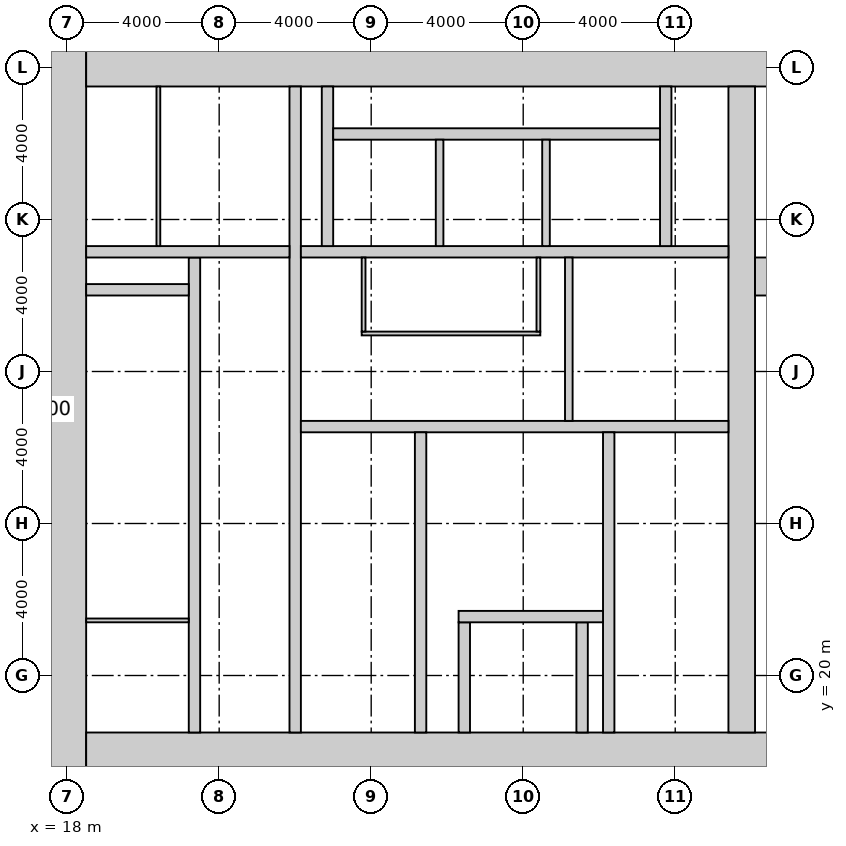
"""IFC4 building model, lengths in metres.
Left out: names, types, materials, properties, quantities, classifications, styles, units other than length and angle.
Written with IfcOpenShell. Run it as: python <this file> out.ifc"""

import sys

from ifc_helpers import new_model, si_unit, direction, frame, frame_2d, origin, place, context, subcontext, project, spatial, rectangle, extrude, element, fill, save


model = new_model("IFC4")
c1 = context("Model", 3, precision=1e-05, world=origin(), true_north=direction((0.0, 1.0)))
c2 = subcontext(c1, "Body", "Model", "MODEL_VIEW")
j1 = project(units=[si_unit("LENGTHUNIT", "METRE"), si_unit("PLANEANGLEUNIT", "RADIAN")], contexts=[c1])
p1 = place(None, origin())
s1 = spatial("IfcSite", under=j1, at=p1, CompositionType="ELEMENT")
p2 = place(p1, origin())
s2 = spatial("IfcBuilding", under=s1, at=p2, CompositionType="ELEMENT")
p3 = place(p2, frame((0.0, 0.0, 19.0)))
s3 = spatial("IfcBuildingStorey", under=s2, at=p3, CompositionType="ELEMENT", Elevation=19.0)
p4 = place(p3, frame((18.0, 17.1, -0.15), z_axis=(0.0, 0.0, 1.0), x_axis=(0.0, 1.0, 0.0)))
e1 = element("IfcWall", 1, at=p4, inside=s3, PredefinedType="SHEAR", context=c2, shape_type="SweptSolid", body=[
    extrude(rectangle(XDim=19.8, YDim=1.0, at=frame_2d((9.9, 0.0))), origin(), (0.0, 0.0, 1.0), 4.0),
])
p5 = place(p3, frame((18.5, 17.8, -0.15), z_axis=(0.0, 0.0, 1.0), x_axis=(1.0, 0.0, 0.0)))
e2 = element("IfcWall", 2, at=p5, inside=s3, PredefinedType="SHEAR", context=c2, shape_type="SweptSolid", body=[
    extrude(rectangle(XDim=23.0, YDim=1.4, at=frame_2d((11.5, 0.0))), origin(), (0.0, 0.0, 1.0), 4.0),
])
p6 = place(p5, frame((3.45, 0.0, 0.15)))
e3 = element("IfcOpeningElement", 3, at=p6, cuts=e2, PredefinedType="OPENING", context=c2, shape_type="SweptSolid", body=[
    extrude(rectangle(XDim=1.5, YDim=2.4, at=frame_2d((0.75, 1.2))), frame((0.0, 0.71, 0.0), z_axis=(0.0, -1.0, 0.0), x_axis=(1.0, 0.0, 0.0)), (0.0, 0.0, 1.0), 1.42),
])
p7 = place(p5, frame((17.9, 0.0, 0.15)))
e4 = element("IfcOpeningElement", 4, at=p7, cuts=e2, PredefinedType="OPENING", context=c2, shape_type="SweptSolid", body=[
    extrude(rectangle(XDim=1.5, YDim=2.4, at=frame_2d((0.75, 1.2))), frame((0.0, 0.71, 0.0), z_axis=(0.0, -1.0, 0.0), x_axis=(1.0, 0.0, 0.0)), (0.0, 0.0, 1.0), 1.42),
])
p8 = place(p5, frame((0.9, 0.0, 0.15)))
e5 = element("IfcOpeningElement", 5, at=p8, cuts=e2, PredefinedType="OPENING", context=c2, shape_type="SweptSolid", body=[
    extrude(rectangle(XDim=1.0, YDim=2.2, at=frame_2d((0.5, 1.1))), frame((0.0, 0.71, 0.0), z_axis=(0.0, -1.0, 0.0), x_axis=(1.0, 0.0, 0.0)), (0.0, 0.0, 1.0), 1.42),
])
p9 = place(p3, frame((18.5, 36.2, -0.15), z_axis=(0.0, 0.0, 1.0), x_axis=(1.0, 0.0, 0.0)))
e6 = element("IfcWall", 6, at=p9, inside=s3, PredefinedType="SHEAR", context=c2, shape_type="SweptSolid", body=[
    extrude(rectangle(XDim=23.0, YDim=1.4, at=frame_2d((11.5, 0.0))), origin(), (0.0, 0.0, 1.0), 4.0),
])
p10 = place(p3, frame((35.75, 18.5, -0.15), z_axis=(0.0, 0.0, 1.0), x_axis=(0.0, 1.0, 0.0)))
e7 = element("IfcWall", 7, at=p10, inside=s3, PredefinedType="SHEAR", context=c2, shape_type="SweptSolid", body=[
    extrude(rectangle(XDim=17.0, YDim=0.7, at=frame_2d((8.5, 0.0))), origin(), (0.0, 0.0, 1.0), 4.0),
])
p11 = place(p10, frame((9.85, 0.0, 0.15)))
e8 = element("IfcOpeningElement", 8, at=p11, cuts=e7, PredefinedType="OPENING", context=c2, shape_type="SweptSolid", body=[
    extrude(rectangle(XDim=1.0, YDim=2.2, at=frame_2d((0.5, 1.1))), frame((0.0, 0.36, 0.0), z_axis=(0.0, -1.0, 0.0), x_axis=(1.0, 0.0, 0.0)), (0.0, 0.0, 1.0), 0.72),
])
p12 = place(p3, frame((24.0, 18.5, -0.15), z_axis=(0.0, 0.0, 1.0), x_axis=(0.0, 1.0, 0.0)))
e9 = element("IfcWall", 9, at=p12, inside=s3, PredefinedType="SHEAR", context=c2, shape_type="SweptSolid", body=[
    extrude(rectangle(XDim=17.0, YDim=0.3, at=frame_2d((8.5, 0.0))), origin(), (0.0, 0.0, 1.0), 4.0),
])
p13 = place(p12, frame((9.6, 0.0, 0.15)))
e10 = element("IfcOpeningElement", 10, at=p13, cuts=e9, PredefinedType="OPENING", context=c2, shape_type="SweptSolid", body=[
    extrude(rectangle(XDim=1.5, YDim=2.4, at=frame_2d((0.75, 1.2))), frame((0.0, 0.16, 0.0), z_axis=(0.0, -1.0, 0.0), x_axis=(1.0, 0.0, 0.0)), (0.0, 0.0, 1.0), 0.32),
])
p14 = place(p3, frame((24.15, 26.55, -0.15), z_axis=(0.0, 0.0, 1.0), x_axis=(1.0, 0.0, 0.0)))
e11 = element("IfcWall", 11, at=p14, inside=s3, PredefinedType="SHEAR", context=c2, shape_type="SweptSolid", body=[
    extrude(rectangle(XDim=11.25, YDim=0.3, at=frame_2d((5.625, 0.0))), origin(), (0.0, 0.0, 1.0), 4.0),
])
p15 = place(p14, frame((9.25, 0.0, 0.15)))
e12 = element("IfcOpeningElement", 12, at=p15, cuts=e11, PredefinedType="OPENING", context=c2, shape_type="SweptSolid", body=[
    extrude(rectangle(XDim=1.0, YDim=2.2, at=frame_2d((0.5, 1.1))), frame((0.0, 0.16, 0.0), z_axis=(0.0, -1.0, 0.0), x_axis=(1.0, 0.0, 0.0)), (0.0, 0.0, 1.0), 0.32),
])
p16 = place(p14, frame((4.9, 0.0, 0.15)))
e13 = element("IfcOpeningElement", 13, at=p16, cuts=e11, PredefinedType="OPENING", context=c2, shape_type="SweptSolid", body=[
    extrude(rectangle(XDim=1.5, YDim=2.4, at=frame_2d((0.75, 1.2))), frame((0.0, 0.16, 0.0), z_axis=(0.0, -1.0, 0.0), x_axis=(1.0, 0.0, 0.0)), (0.0, 0.0, 1.0), 0.32),
])
p17 = place(p3, frame((27.3, 18.5, -0.15), z_axis=(0.0, 0.0, 1.0), x_axis=(0.0, 1.0, 0.0)))
e14 = element("IfcWall", 14, at=p17, inside=s3, PredefinedType="SHEAR", context=c2, shape_type="SweptSolid", body=[
    extrude(rectangle(XDim=7.9, YDim=0.3, at=frame_2d((3.95, 0.0))), origin(), (0.0, 0.0, 1.0), 4.0),
])
p18 = place(p17, frame((6.4, 0.0, 0.15)))
e15 = element("IfcOpeningElement", 15, at=p18, cuts=e14, PredefinedType="OPENING", context=c2, shape_type="SweptSolid", body=[
    extrude(rectangle(XDim=1.0, YDim=2.2, at=frame_2d((0.5, 1.1))), frame((0.0, 0.16, 0.0), z_axis=(0.0, -1.0, 0.0), x_axis=(1.0, 0.0, 0.0)), (0.0, 0.0, 1.0), 0.32),
])
p19 = place(p3, frame((32.25, 18.5, -0.15), z_axis=(0.0, 0.0, 1.0), x_axis=(0.0, 1.0, 0.0)))
e16 = element("IfcWall", 16, at=p19, inside=s3, PredefinedType="SHEAR", context=c2, shape_type="SweptSolid", body=[
    extrude(rectangle(XDim=7.9, YDim=0.3, at=frame_2d((3.95, 0.0))), origin(), (0.0, 0.0, 1.0), 4.0),
])
for number, where, z_axis, x_axis in (
    (17, (28.45, 18.5, -0.15), (0.0, 0.0, 1.0), (0.0, 1.0, 0.0)),
    (18, (31.55, 18.5, -0.15), (0.0, 0.0, 1.0), (0.0, 1.0, 0.0)),
):
    element("IfcWall", number, at=place(p3, frame(where, z_axis=z_axis, x_axis=x_axis)), inside=s3, PredefinedType="SHEAR", context=c2, shape_type="SweptSolid", body=[
        extrude(rectangle(XDim=2.9, YDim=0.3, at=frame_2d((1.45, 0.0))), origin(), (0.0, 0.0, 1.0), 4.0),
    ])
p20 = place(p3, frame((28.3, 21.55, -0.15), z_axis=(0.0, 0.0, 1.0), x_axis=(1.0, 0.0, 0.0)))
e19 = element("IfcWall", 19, at=p20, inside=s3, PredefinedType="SHEAR", context=c2, shape_type="SweptSolid", body=[
    extrude(rectangle(XDim=3.8, YDim=0.3, at=frame_2d((1.9, 0.0))), origin(), (0.0, 0.0, 1.0), 4.0),
])
p21 = place(p20, frame((1.05, 0.0, 0.15)))
e20 = element("IfcOpeningElement", 20, at=p21, cuts=e19, PredefinedType="OPENING", context=c2, shape_type="SweptSolid", body=[
    extrude(rectangle(XDim=1.3, YDim=2.4, at=frame_2d((0.65, 1.2))), frame((0.0, 0.16, 0.0), z_axis=(0.0, -1.0, 0.0), x_axis=(1.0, 0.0, 0.0)), (0.0, 0.0, 1.0), 0.32),
])
p22 = place(p3, frame((24.15, 31.15, -0.15), z_axis=(0.0, 0.0, 1.0), x_axis=(1.0, 0.0, 0.0)))
e21 = element("IfcWall", 21, at=p22, inside=s3, PredefinedType="SHEAR", context=c2, shape_type="SweptSolid", body=[
    extrude(rectangle(XDim=11.25, YDim=0.3, at=frame_2d((5.625, 0.0))), origin(), (0.0, 0.0, 1.0), 4.0),
])
p23 = place(p22, frame((7.25, 0.0, 0.15)))
e22 = element("IfcOpeningElement", 22, at=p23, cuts=e21, PredefinedType="OPENING", context=c2, shape_type="SweptSolid", body=[
    extrude(rectangle(XDim=1.4, YDim=2.4, at=frame_2d((0.7, 1.2))), frame((0.0, 0.16, 0.0), z_axis=(0.0, -1.0, 0.0), x_axis=(1.0, 0.0, 0.0)), (0.0, 0.0, 1.0), 0.32),
])
p24 = place(p3, frame((21.35, 18.5, -0.15), z_axis=(0.0, 0.0, 1.0), x_axis=(0.0, 1.0, 0.0)))
e23 = element("IfcWall", 23, at=p24, inside=s3, PredefinedType="SHEAR", context=c2, shape_type="SweptSolid", body=[
    extrude(rectangle(XDim=12.5, YDim=0.3, at=frame_2d((6.25, 0.0))), origin(), (0.0, 0.0, 1.0), 4.0),
])
p25 = place(p24, frame((6.725, 0.0, 0.15)))
e24 = element("IfcOpeningElement", 24, at=p25, cuts=e23, PredefinedType="OPENING", context=c2, shape_type="SweptSolid", body=[
    extrude(rectangle(XDim=1.0, YDim=2.2, at=frame_2d((0.5, 1.1))), frame((0.0, 0.16, 0.0), z_axis=(0.0, -1.0, 0.0), x_axis=(1.0, 0.0, 0.0)), (0.0, 0.0, 1.0), 0.32),
])
p26 = place(p3, frame((18.5, 31.15, -0.15), z_axis=(0.0, 0.0, 1.0), x_axis=(1.0, 0.0, 0.0)))
e25 = element("IfcWall", 25, at=p26, inside=s3, PredefinedType="SHEAR", context=c2, shape_type="SweptSolid", body=[
    extrude(rectangle(XDim=5.35, YDim=0.3, at=frame_2d((2.675, 0.0))), origin(), (0.0, 0.0, 1.0), 4.0),
])
p27 = place(p26, frame((3.4, 0.0, 0.15)))
e26 = element("IfcOpeningElement", 26, at=p27, cuts=e25, PredefinedType="OPENING", context=c2, shape_type="SweptSolid", body=[
    extrude(rectangle(XDim=1.0, YDim=2.2, at=frame_2d((0.5, 1.1))), frame((0.0, 0.16, 0.0), z_axis=(0.0, -1.0, 0.0), x_axis=(1.0, 0.0, 0.0)), (0.0, 0.0, 1.0), 0.32),
])
p28 = place(p3, frame((18.5, 30.15, -0.15), z_axis=(0.0, 0.0, 1.0), x_axis=(1.0, 0.0, 0.0)))
e27 = element("IfcWall", 27, at=p28, inside=s3, PredefinedType="SHEAR", context=c2, shape_type="SweptSolid", body=[
    extrude(rectangle(XDim=2.7, YDim=0.3, at=frame_2d((1.35, 0.0))), origin(), (0.0, 0.0, 1.0), 4.0),
])
for number, where, z_axis, x_axis in (
    (28, (24.85, 31.3, -0.15), (0.0, 0.0, 1.0), (0.0, 1.0, 0.0)),
    (29, (33.75, 31.3, -0.15), (0.0, 0.0, 1.0), (0.0, 1.0, 0.0)),
):
    element("IfcWall", number, at=place(p3, frame(where, z_axis=z_axis, x_axis=x_axis)), inside=s3, PredefinedType="SHEAR", context=c2, shape_type="SweptSolid", body=[
        extrude(rectangle(XDim=4.2, YDim=0.3, at=frame_2d((2.1, 0.0))), origin(), (0.0, 0.0, 1.0), 4.0),
    ])
p29 = place(p3, frame((25.0, 34.25, -0.15), z_axis=(0.0, 0.0, 1.0), x_axis=(1.0, 0.0, 0.0)))
e30 = element("IfcWall", 30, at=p29, inside=s3, PredefinedType="SHEAR", context=c2, shape_type="SweptSolid", body=[
    extrude(rectangle(XDim=8.6, YDim=0.3, at=frame_2d((4.3, 0.0))), origin(), (0.0, 0.0, 1.0), 4.0),
])
for number, where, z_axis, x_axis in (
    (31, (27.8, 31.3, -0.15), (0.0, 0.0, 1.0), (0.0, 1.0, 0.0)),
    (32, (30.6, 31.3, -0.15), (0.0, 0.0, 1.0), (0.0, 1.0, 0.0)),
):
    element("IfcWall", number, at=place(p3, frame(where, z_axis=z_axis, x_axis=x_axis)), inside=s3, PredefinedType="SOLIDWALL", context=c2, shape_type="SweptSolid", body=[
        extrude(rectangle(XDim=2.8, YDim=0.2, at=frame_2d((1.4, 0.0))), origin(), (0.0, 0.0, 1.0), 4.0),
    ])
p30 = place(p3, frame((36.1, 30.5, -0.15), z_axis=(0.0, 0.0, 1.0), x_axis=(1.0, 0.0, 0.0)))
e33 = element("IfcWall", 33, at=p30, inside=s3, PredefinedType="SHEAR", context=c2, shape_type="SweptSolid", body=[
    extrude(rectangle(XDim=5.4, YDim=1.0, at=frame_2d((2.7, 0.0))), origin(), (0.0, 0.0, 1.0), 4.0),
])
p31 = place(p30, frame((0.6, 0.0, 0.15)))
e34 = element("IfcOpeningElement", 34, at=p31, cuts=e33, PredefinedType="OPENING", context=c2, shape_type="SweptSolid", body=[
    extrude(rectangle(XDim=1.0, YDim=2.2, at=frame_2d((0.5, 1.1))), frame((0.0, 0.51, 0.0), z_axis=(0.0, -1.0, 0.0), x_axis=(1.0, 0.0, 0.0)), (0.0, 0.0, 1.0), 1.02),
])
p32 = place(p3, frame((31.2, 26.7, 0.0), z_axis=(0.0, 0.0, 1.0), x_axis=(0.0, 1.0, 0.0)))
e35 = element("IfcWall", 35, at=p32, inside=s3, PredefinedType="SOLIDWALL", context=c2, shape_type="SweptSolid", body=[
    extrude(rectangle(XDim=4.3, YDim=0.2, at=frame_2d((2.15, 0.0))), origin(), (0.0, 0.0, 1.0), 3.85),
])
p33 = place(p3, frame((20.4, 31.3, 0.0), z_axis=(0.0, 0.0, 1.0), x_axis=(0.0, 1.0, 0.0)))
e36 = element("IfcWall", 36, at=p33, inside=s3, PredefinedType="PARTITIONING", context=c2, shape_type="SweptSolid", body=[
    extrude(rectangle(XDim=4.2, YDim=0.1, at=frame_2d((2.1, 0.0))), origin(), (0.0, 0.0, 1.0), 3.85),
])
p34 = place(p33, frame((1.55, 0.0, 0.0)))
e37 = element("IfcOpeningElement", 37, at=p34, cuts=e36, PredefinedType="OPENING", context=c2, shape_type="SweptSolid", body=[
    extrude(rectangle(XDim=1.0, YDim=2.2, at=frame_2d((0.5, 1.1))), frame((0.0, 0.06, 0.0), z_axis=(0.0, -1.0, 0.0), x_axis=(1.0, 0.0, 0.0)), (0.0, 0.0, 1.0), 0.12),
])
p35 = place(p3, frame((25.75, 29.0, 0.0), z_axis=(0.0, 0.0, 1.0), x_axis=(1.0, 0.0, 0.0)))
e38 = element("IfcWall", 38, at=p35, inside=s3, PredefinedType="PARTITIONING", context=c2, shape_type="SweptSolid", body=[
    extrude(rectangle(XDim=4.7, YDim=0.1, at=frame_2d((2.35, 0.0))), origin(), (0.0, 0.0, 1.0), 3.85),
])
p36 = place(p35, frame((1.85, 0.0, 0.0)))
e39 = element("IfcOpeningElement", 39, at=p36, cuts=e38, PredefinedType="OPENING", context=c2, shape_type="SweptSolid", body=[
    extrude(rectangle(XDim=1.0, YDim=2.2, at=frame_2d((0.5, 1.1))), frame((0.0, 0.06, 0.0), z_axis=(0.0, -1.0, 0.0), x_axis=(1.0, 0.0, 0.0)), (0.0, 0.0, 1.0), 0.12),
])
for number, where, z_axis, x_axis in (
    (40, (25.8, 29.05, 0.0), (0.0, 0.0, 1.0), (0.0, 1.0, 0.0)),
    (41, (30.4, 29.05, 0.0), (0.0, 0.0, 1.0), (0.0, 1.0, 0.0)),
):
    element("IfcWall", number, at=place(p3, frame(where, z_axis=z_axis, x_axis=x_axis)), inside=s3, PredefinedType="PARTITIONING", context=c2, shape_type="SweptSolid", body=[
        extrude(rectangle(XDim=1.95, YDim=0.1, at=frame_2d((0.975, 0.0))), origin(), (0.0, 0.0, 1.0), 3.85),
    ])
p37 = place(p3, frame((18.5, 21.45, 0.0), z_axis=(0.0, 0.0, 1.0), x_axis=(1.0, 0.0, 0.0)))
e42 = element("IfcWall", 42, at=p37, inside=s3, PredefinedType="PARTITIONING", context=c2, shape_type="SweptSolid", body=[
    extrude(rectangle(XDim=2.7, YDim=0.1, at=frame_2d((1.35, 0.0))), origin(), (0.0, 0.0, 1.0), 3.85),
])
p38 = place(p18, origin())
e43 = element("IfcDoor", 43, at=p38, inside=s3, OperationType="SINGLE_SWING_RIGHT", PredefinedType="DOOR", context=c2, shape_type="SweptSolid", body=[
    extrude(rectangle(XDim=1.0, YDim=2.2, at=frame_2d((0.5, 1.1))), frame((0.0, 0.025, 0.0), z_axis=(0.0, -1.0, 0.0), x_axis=(1.0, 0.0, 0.0)), (0.0, 0.0, 1.0), 0.05),
])
fill(e15, e43)
p39 = place(p15, frame((1.0, 0.0, 0.0), z_axis=(0.0, 0.0, 1.0), x_axis=(-1.0, 0.0, 0.0)))
e44 = element("IfcDoor", 44, at=p39, inside=s3, OperationType="SINGLE_SWING_RIGHT", PredefinedType="DOOR", context=c2, shape_type="SweptSolid", body=[
    extrude(rectangle(XDim=1.0, YDim=2.2, at=frame_2d((0.5, 1.1))), frame((0.0, 0.025, 0.0), z_axis=(0.0, -1.0, 0.0), x_axis=(1.0, 0.0, 0.0)), (0.0, 0.0, 1.0), 0.05),
])
fill(e12, e44)
p40 = place(p11, origin())
e45 = element("IfcDoor", 45, at=p40, inside=s3, OperationType="SINGLE_SWING_RIGHT", PredefinedType="DOOR", context=c2, shape_type="SweptSolid", body=[
    extrude(rectangle(XDim=1.0, YDim=2.2, at=frame_2d((0.5, 1.1))), frame((0.0, 0.025, 0.0), z_axis=(0.0, -1.0, 0.0), x_axis=(1.0, 0.0, 0.0)), (0.0, 0.0, 1.0), 0.05),
])
fill(e8, e45)
p41 = place(p16, origin())
e46 = element("IfcDoor", 46, at=p41, inside=s3, OperationType="DOUBLE_DOOR_DOUBLE_SWING", PredefinedType="DOOR", context=c2, shape_type="SweptSolid", body=[
    extrude(rectangle(XDim=1.5, YDim=2.4, at=frame_2d((0.75, 1.2))), frame((0.0, 0.025, 0.0), z_axis=(0.0, -1.0, 0.0), x_axis=(1.0, 0.0, 0.0)), (0.0, 0.0, 1.0), 0.05),
])
fill(e13, e46)
p42 = place(p13, origin())
e47 = element("IfcDoor", 47, at=p42, inside=s3, OperationType="DOUBLE_DOOR_DOUBLE_SWING", PredefinedType="DOOR", context=c2, shape_type="SweptSolid", body=[
    extrude(rectangle(XDim=1.5, YDim=2.4, at=frame_2d((0.75, 1.2))), frame((0.0, 0.025, 0.0), z_axis=(0.0, -1.0, 0.0), x_axis=(1.0, 0.0, 0.0)), (0.0, 0.0, 1.0), 0.05),
])
fill(e10, e47)
p43 = place(p27, origin())
e48 = element("IfcDoor", 48, at=p43, inside=s3, OperationType="SINGLE_SWING_LEFT", PredefinedType="DOOR", context=c2, shape_type="SweptSolid", body=[
    extrude(rectangle(XDim=1.0, YDim=2.2, at=frame_2d((0.5, 1.1))), frame((0.0, 0.025, 0.0), z_axis=(0.0, -1.0, 0.0), x_axis=(1.0, 0.0, 0.0)), (0.0, 0.0, 1.0), 0.05),
])
fill(e26, e48)
p44 = place(p34, origin())
e49 = element("IfcDoor", 49, at=p44, inside=s3, OperationType="SINGLE_SWING_LEFT", PredefinedType="DOOR", context=c2, shape_type="SweptSolid", body=[
    extrude(rectangle(XDim=1.0, YDim=2.2, at=frame_2d((0.5, 1.1))), frame((0.0, 0.025, 0.0), z_axis=(0.0, -1.0, 0.0), x_axis=(1.0, 0.0, 0.0)), (0.0, 0.0, 1.0), 0.05),
])
fill(e37, e49)
p45 = place(p36, origin())
e50 = element("IfcDoor", 50, at=p45, inside=s3, OperationType="SINGLE_SWING_LEFT", PredefinedType="DOOR", context=c2, shape_type="SweptSolid", body=[
    extrude(rectangle(XDim=1.0, YDim=2.2, at=frame_2d((0.5, 1.1))), frame((0.0, 0.025, 0.0), z_axis=(0.0, -1.0, 0.0), x_axis=(1.0, 0.0, 0.0)), (0.0, 0.0, 1.0), 0.05),
])
fill(e39, e50)
p46 = place(p25, origin())
e51 = element("IfcDoor", 51, at=p46, inside=s3, OperationType="SINGLE_SWING_LEFT", PredefinedType="DOOR", context=c2, shape_type="SweptSolid", body=[
    extrude(rectangle(XDim=1.0, YDim=2.2, at=frame_2d((0.5, 1.1))), frame((0.0, 0.025, 0.0), z_axis=(0.0, -1.0, 0.0), x_axis=(1.0, 0.0, 0.0)), (0.0, 0.0, 1.0), 0.05),
])
fill(e24, e51)
p47 = place(p6, origin())
e52 = element("IfcDoor", 52, at=p47, inside=s3, OperationType="DOUBLE_DOOR_DOUBLE_SWING", PredefinedType="DOOR", context=c2, shape_type="SweptSolid", body=[
    extrude(rectangle(XDim=1.5, YDim=2.4, at=frame_2d((0.75, 1.2))), frame((0.0, 0.025, 0.0), z_axis=(0.0, -1.0, 0.0), x_axis=(1.0, 0.0, 0.0)), (0.0, 0.0, 1.0), 0.05),
])
fill(e3, e52)
p48 = place(p8, origin())
e53 = element("IfcDoor", 53, at=p48, inside=s3, OperationType="SINGLE_SWING_LEFT", PredefinedType="DOOR", context=c2, shape_type="SweptSolid", body=[
    extrude(rectangle(XDim=1.0, YDim=2.2, at=frame_2d((0.5, 1.1))), frame((0.0, 0.025, 0.0), z_axis=(0.0, -1.0, 0.0), x_axis=(1.0, 0.0, 0.0)), (0.0, 0.0, 1.0), 0.05),
])
fill(e5, e53)
p49 = place(p21, origin())
e54 = element("IfcDoor", 54, at=p49, inside=s3, OperationType="DOUBLE_DOOR_SLIDING", PredefinedType="DOOR", context=c2, shape_type="SweptSolid", body=[
    extrude(rectangle(XDim=1.3, YDim=2.4, at=frame_2d((0.65, 1.2))), frame((0.0, 0.025, 0.0), z_axis=(0.0, -1.0, 0.0), x_axis=(1.0, 0.0, 0.0)), (0.0, 0.0, 1.0), 0.05),
])
fill(e20, e54)
p50 = place(p23, origin())
e55 = element("IfcDoor", 55, at=p50, inside=s3, OperationType="DOUBLE_DOOR_SLIDING", PredefinedType="DOOR", context=c2, shape_type="SweptSolid", body=[
    extrude(rectangle(XDim=1.4, YDim=2.4, at=frame_2d((0.7, 1.2))), frame((0.0, 0.025, 0.0), z_axis=(0.0, -1.0, 0.0), x_axis=(1.0, 0.0, 0.0)), (0.0, 0.0, 1.0), 0.05),
])
fill(e22, e55)
save(model, sys.argv[1])
